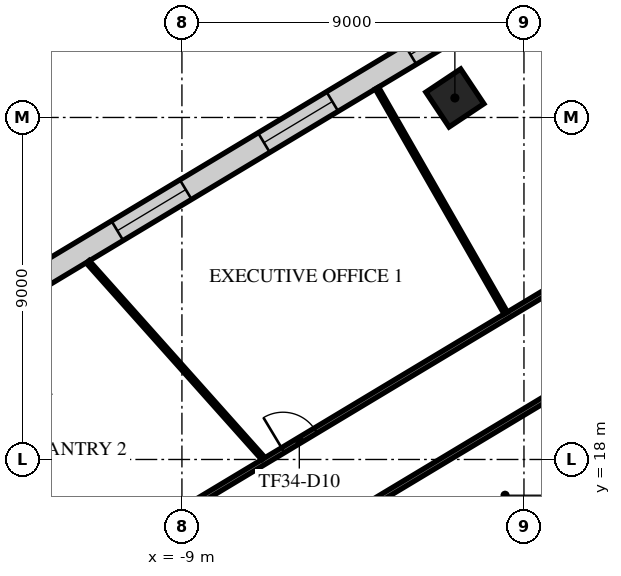
"""IFC4 building model, lengths in metres.
Left out: names, types, materials, properties, quantities, classifications, styles, units other than length and angle.
Written with IfcOpenShell. Run it as: python <this file> out.ifc"""

import sys

from ifc_helpers import new_model, si_unit, direction, frame, frame_2d, origin, origin_2d, place, context, subcontext, project, spatial, rectangle, extrude, element, fill, save


model = new_model("IFC4")
c1 = context("Model", 3, precision=1e-05, world=origin(), true_north=direction((0.0, 1.0)))
c2 = subcontext(c1, "Body", "Model", "MODEL_VIEW")
j1 = project(units=[si_unit("LENGTHUNIT", "METRE"), si_unit("PLANEANGLEUNIT", "RADIAN")], contexts=[c1])
p1 = place(None, origin())
s1 = spatial("IfcSite", under=j1, at=p1, CompositionType="ELEMENT")
p2 = place(p1, origin())
s2 = spatial("IfcBuilding", under=s1, at=p2, CompositionType="ELEMENT")
p3 = place(p2, frame((0.0, 0.0, 147.7)))
s3 = spatial("IfcBuildingStorey", under=s2, at=p3, CompositionType="ELEMENT", Elevation=147.7)
p4 = place(p3, frame((-1.818, 27.513, 0.0), z_axis=(0.0, 0.0, 1.0), x_axis=(0.832028680356, 0.55473261583, 0.0)))
e1 = element("IfcColumn", 1, at=p4, inside=s3, PredefinedType="COLUMN", context=c2, shape_type="SweptSolid", body=[
    extrude(rectangle(XDim=1.1, YDim=1.1, at=origin_2d()), origin(), (0.0, 0.0, 1.0), 4.0),
])
p5 = place(p3, frame((7.558, 34.99, 0.0), z_axis=(0.0, 0.0, 1.0), x_axis=(-0.857166849875, -0.515038825212, 0.0)))
e2 = element("IfcWall", 2, at=p5, inside=s3, PredefinedType="STANDARD", context=c2, shape_type="SweptSolid", body=[
    extrude(rectangle(XDim=49.376, YDim=0.6, at=frame_2d((24.688, 0.0))), origin(), (0.0, 0.0, 1.0), 3.6),
])
p6 = place(p5, frame((1.2, 0.0, 0.9)))
e3 = element("IfcOpeningElement", 3, at=p6, cuts=e2, PredefinedType="OPENING", context=c2, shape_type="SweptSolid", body=[
    extrude(rectangle(XDim=2.1, YDim=2.1, at=frame_2d((1.05, 1.05))), frame((0.0, 0.31, 0.0), z_axis=(0.0, -1.0, 0.0), x_axis=(1.0, 0.0, 0.0)), (0.0, 0.0, 1.0), 0.62),
])
p7 = place(p5, frame((5.7, 0.0, 0.9)))
e4 = element("IfcOpeningElement", 4, at=p7, cuts=e2, PredefinedType="OPENING", context=c2, shape_type="SweptSolid", body=[
    extrude(rectangle(XDim=2.1, YDim=2.1, at=frame_2d((1.05, 1.05))), frame((0.0, 0.31, 0.0), z_axis=(0.0, -1.0, 0.0), x_axis=(1.0, 0.0, 0.0)), (0.0, 0.0, 1.0), 0.62),
])
p8 = place(p5, frame((10.2, 0.0, 0.9)))
e5 = element("IfcOpeningElement", 5, at=p8, cuts=e2, PredefinedType="OPENING", context=c2, shape_type="SweptSolid", body=[
    extrude(rectangle(XDim=2.1, YDim=2.1, at=frame_2d((1.05, 1.05))), frame((0.0, 0.31, 0.0), z_axis=(0.0, -1.0, 0.0), x_axis=(1.0, 0.0, 0.0)), (0.0, 0.0, 1.0), 0.62),
])
p9 = place(p5, frame((14.7, 0.0, 0.9)))
e6 = element("IfcOpeningElement", 6, at=p9, cuts=e2, PredefinedType="OPENING", context=c2, shape_type="SweptSolid", body=[
    extrude(rectangle(XDim=2.1, YDim=2.1, at=frame_2d((1.05, 1.05))), frame((0.0, 0.31, 0.0), z_axis=(0.0, -1.0, 0.0), x_axis=(1.0, 0.0, 0.0)), (0.0, 0.0, 1.0), 0.62),
])
p10 = place(p5, frame((19.2, 0.0, 0.9)))
e7 = element("IfcOpeningElement", 7, at=p10, cuts=e2, PredefinedType="OPENING", context=c2, shape_type="SweptSolid", body=[
    extrude(rectangle(XDim=2.1, YDim=2.1, at=frame_2d((1.05, 1.05))), frame((0.0, 0.31, 0.0), z_axis=(0.0, -1.0, 0.0), x_axis=(1.0, 0.0, 0.0)), (0.0, 0.0, 1.0), 0.62),
])
p11 = place(p5, frame((23.7, 0.0, 0.9)))
e8 = element("IfcOpeningElement", 8, at=p11, cuts=e2, PredefinedType="OPENING", context=c2, shape_type="SweptSolid", body=[
    extrude(rectangle(XDim=2.1, YDim=2.1, at=frame_2d((1.05, 1.05))), frame((0.0, 0.31, 0.0), z_axis=(0.0, -1.0, 0.0), x_axis=(1.0, 0.0, 0.0)), (0.0, 0.0, 1.0), 0.62),
])
p12 = place(p5, frame((28.2, 0.0, 0.9)))
e9 = element("IfcOpeningElement", 9, at=p12, cuts=e2, PredefinedType="OPENING", context=c2, shape_type="SweptSolid", body=[
    extrude(rectangle(XDim=2.1, YDim=2.1, at=frame_2d((1.05, 1.05))), frame((0.0, 0.31, 0.0), z_axis=(0.0, -1.0, 0.0), x_axis=(1.0, 0.0, 0.0)), (0.0, 0.0, 1.0), 0.62),
])
p13 = place(p5, frame((32.7, 0.0, 0.9)))
e10 = element("IfcOpeningElement", 10, at=p13, cuts=e2, PredefinedType="OPENING", context=c2, shape_type="SweptSolid", body=[
    extrude(rectangle(XDim=2.1, YDim=2.1, at=frame_2d((1.05, 1.05))), frame((0.0, 0.31, 0.0), z_axis=(0.0, -1.0, 0.0), x_axis=(1.0, 0.0, 0.0)), (0.0, 0.0, 1.0), 0.62),
])
p14 = place(p5, frame((37.2, 0.0, 0.9)))
e11 = element("IfcOpeningElement", 11, at=p14, cuts=e2, PredefinedType="OPENING", context=c2, shape_type="SweptSolid", body=[
    extrude(rectangle(XDim=2.1, YDim=2.1, at=frame_2d((1.05, 1.05))), frame((0.0, 0.31, 0.0), z_axis=(0.0, -1.0, 0.0), x_axis=(1.0, 0.0, 0.0)), (0.0, 0.0, 1.0), 0.62),
])
p15 = place(p5, frame((41.7, 0.0, 0.9)))
e12 = element("IfcOpeningElement", 12, at=p15, cuts=e2, PredefinedType="OPENING", context=c2, shape_type="SweptSolid", body=[
    extrude(rectangle(XDim=2.1, YDim=2.1, at=frame_2d((1.05, 1.05))), frame((0.0, 0.31, 0.0), z_axis=(0.0, -1.0, 0.0), x_axis=(1.0, 0.0, 0.0)), (0.0, 0.0, 1.0), 0.62),
])
p16 = place(p5, frame((46.138, 0.0, 0.9)))
e13 = element("IfcOpeningElement", 13, at=p16, cuts=e2, PredefinedType="OPENING", context=c2, shape_type="SweptSolid", body=[
    extrude(rectangle(XDim=2.1, YDim=2.1, at=frame_2d((1.05, 1.05))), frame((0.0, 0.31, 0.0), z_axis=(0.0, -1.0, 0.0), x_axis=(1.0, 0.0, 0.0)), (0.0, 0.0, 1.0), 0.62),
])
p17 = place(p3, frame((-23.876, 7.707, 0.0), z_axis=(0.0, 0.0, 1.0), x_axis=(0.857167605318, 0.515037567943, 0.0)))
e14 = element("IfcWall", 14, at=p17, inside=s3, PredefinedType="PARTITIONING", context=c2, shape_type="SweptSolid", body=[
    extrude(rectangle(XDim=32.994, YDim=0.15, at=frame_2d((16.497, 0.0))), origin(), (0.0, 0.0, 1.0), 3.15),
])
p18 = place(p17, frame((1.8, 0.0, 0.0)))
e15 = element("IfcOpeningElement", 15, at=p18, cuts=e14, PredefinedType="OPENING", context=c2, shape_type="SweptSolid", body=[
    extrude(rectangle(XDim=1.8, YDim=2.1, at=frame_2d((0.9, 1.05))), frame((0.0, 0.085, 0.0), z_axis=(0.0, -1.0, 0.0), x_axis=(1.0, 0.0, 0.0)), (0.0, 0.0, 1.0), 0.17),
])
p19 = place(p17, frame((10.3, 0.0, 0.0)))
e16 = element("IfcOpeningElement", 16, at=p19, cuts=e14, PredefinedType="OPENING", context=c2, shape_type="SweptSolid", body=[
    extrude(rectangle(XDim=1.0, YDim=2.1, at=frame_2d((0.5, 1.05))), frame((0.0, 0.085, 0.0), z_axis=(0.0, -1.0, 0.0), x_axis=(1.0, 0.0, 0.0)), (0.0, 0.0, 1.0), 0.17),
])
p20 = place(p17, frame((14.059, 0.0, 0.0)))
e17 = element("IfcOpeningElement", 17, at=p20, cuts=e14, PredefinedType="OPENING", context=c2, shape_type="SweptSolid", body=[
    extrude(rectangle(XDim=1.0, YDim=2.1, at=frame_2d((0.5, 1.05))), frame((0.0, 0.085, 0.0), z_axis=(0.0, -1.0, 0.0), x_axis=(1.0, 0.0, 0.0)), (0.0, 0.0, 1.0), 0.17),
])
p21 = place(p17, frame((20.458, 0.0, 0.0)))
e18 = element("IfcOpeningElement", 18, at=p21, cuts=e14, PredefinedType="OPENING", context=c2, shape_type="SweptSolid", body=[
    extrude(rectangle(XDim=1.0, YDim=2.1, at=frame_2d((0.5, 1.05))), frame((0.0, 0.085, 0.0), z_axis=(0.0, -1.0, 0.0), x_axis=(1.0, 0.0, 0.0)), (0.0, 0.0, 1.0), 0.17),
])
p22 = place(p3, frame((-6.16, 15.552, 0.0), z_axis=(0.0, 0.0, 1.0), x_axis=(0.857176686564, 0.51502245389, 0.0)))
e19 = element("IfcWall", 19, at=p22, inside=s3, PredefinedType="PARTITIONING", context=c2, shape_type="SweptSolid", body=[
    extrude(rectangle(XDim=13.767, YDim=0.15, at=frame_2d((6.884, 0.0))), origin(), (0.0, 0.0, 1.0), 3.15),
])
p23 = place(p3, frame((-11.477, 23.201, 0.0), z_axis=(0.0, 0.0, 1.0), x_axis=(0.665742072215, -0.74618194382, 0.0)))
e20 = element("IfcWall", 20, at=p23, inside=s3, PredefinedType="PARTITIONING", context=c2, shape_type="SweptSolid", body=[
    extrude(rectangle(XDim=6.932, YDim=0.1, at=frame_2d((3.466, 0.0))), origin(), (0.0, 0.0, 1.0), 2.9),
])
p24 = place(p3, frame((-3.869, 27.772, 0.0), z_axis=(0.0, 0.0, 1.0), x_axis=(0.496921350826, -0.867795581398, 0.0)))
e21 = element("IfcWall", 21, at=p24, inside=s3, PredefinedType="PARTITIONING", context=c2, shape_type="SweptSolid", body=[
    extrude(rectangle(XDim=6.82, YDim=0.1, at=frame_2d((3.41, 0.0))), origin(), (0.0, 0.0, 1.0), 2.9),
])
p25 = place(p8, origin())
e22 = element("IfcWindow", 22, at=p25, inside=s3, PartitioningType="SINGLE_PANEL", PredefinedType="WINDOW", context=c2, shape_type="SweptSolid", body=[
    extrude(rectangle(XDim=2.1, YDim=2.1, at=frame_2d((1.05, 1.05))), frame((0.0, 0.03, 0.0), z_axis=(0.0, -1.0, 0.0), x_axis=(1.0, 0.0, 0.0)), (0.0, 0.0, 1.0), 0.06),
])
fill(e5, e22)
p26 = place(p9, origin())
e23 = element("IfcWindow", 23, at=p26, inside=s3, PartitioningType="SINGLE_PANEL", PredefinedType="WINDOW", context=c2, shape_type="SweptSolid", body=[
    extrude(rectangle(XDim=2.1, YDim=2.1, at=frame_2d((1.05, 1.05))), frame((0.0, 0.03, 0.0), z_axis=(0.0, -1.0, 0.0), x_axis=(1.0, 0.0, 0.0)), (0.0, 0.0, 1.0), 0.06),
])
fill(e6, e23)
p27 = place(p10, origin())
e24 = element("IfcWindow", 24, at=p27, inside=s3, PartitioningType="SINGLE_PANEL", PredefinedType="WINDOW", context=c2, shape_type="SweptSolid", body=[
    extrude(rectangle(XDim=2.1, YDim=2.1, at=frame_2d((1.05, 1.05))), frame((0.0, 0.03, 0.0), z_axis=(0.0, -1.0, 0.0), x_axis=(1.0, 0.0, 0.0)), (0.0, 0.0, 1.0), 0.06),
])
fill(e7, e24)
p28 = place(p21, origin())
e25 = element("IfcDoor", 25, at=p28, inside=s3, OperationType="SINGLE_SWING_LEFT", PredefinedType="DOOR", context=c2, shape_type="SweptSolid", body=[
    extrude(rectangle(XDim=1.0, YDim=2.1, at=frame_2d((0.5, 1.05))), frame((0.0, 0.025, 0.0), z_axis=(0.0, -1.0, 0.0), x_axis=(1.0, 0.0, 0.0)), (0.0, 0.0, 1.0), 0.05),
])
fill(e18, e25)
save(model, sys.argv[1])
